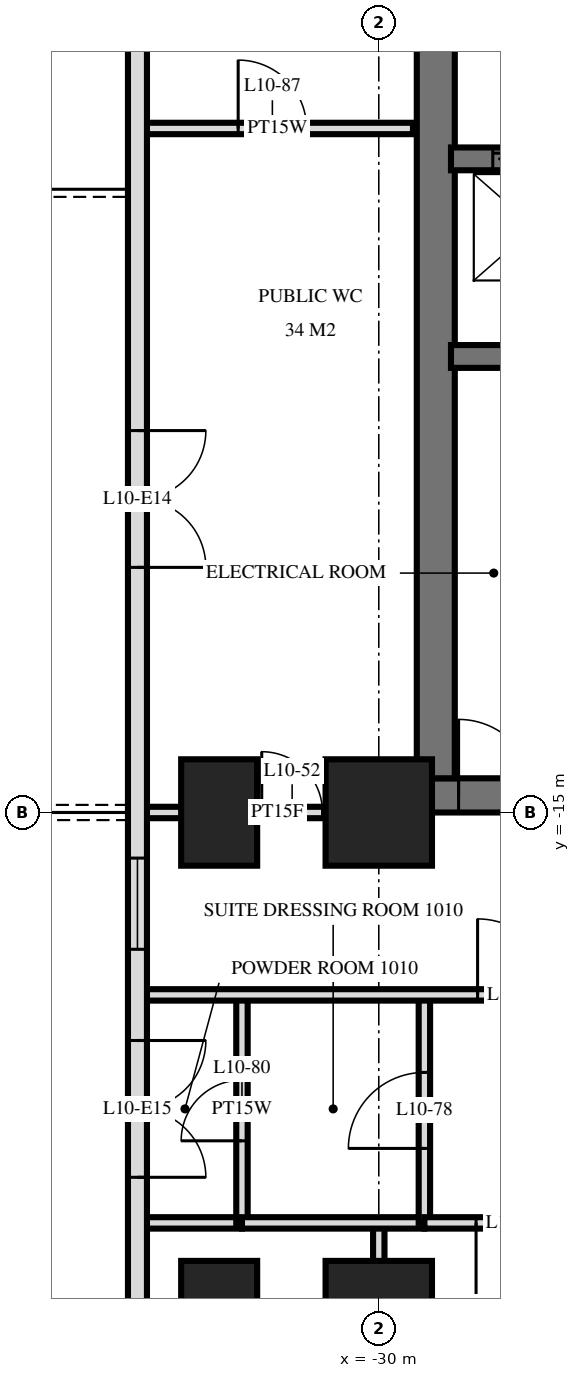
"""IFC4 building model, lengths in metres.
Left out: names, types, materials, properties, quantities, classifications, styles, units other than length and angle.
Written with IfcOpenShell. Run it as: python <this file> out.ifc"""

import sys

from ifc_helpers import new_model, si_unit, direction, frame, frame_2d, origin, origin_2d, place, context, subcontext, project, spatial, rectangle, extrude, element, fill, save


model = new_model("IFC4")
c1 = context("Model", 3, precision=1e-05, world=origin(), true_north=direction((0.0, 1.0)))
c2 = subcontext(c1, "Body", "Model", "MODEL_VIEW")
j1 = project(units=[si_unit("LENGTHUNIT", "METRE"), si_unit("PLANEANGLEUNIT", "RADIAN")], contexts=[c1])
p1 = place(None, origin())
s1 = spatial("IfcSite", under=j1, at=p1, CompositionType="ELEMENT")
p2 = place(p1, origin())
s2 = spatial("IfcBuilding", under=s1, at=p2, CompositionType="ELEMENT")
p3 = place(p2, frame((0.0, 0.0, 45.6)))
s3 = spatial("IfcBuildingStorey", under=s2, at=p3, CompositionType="ELEMENT", Elevation=45.6)
for number, where, z_axis, x_axis in (
    (1, (-32.1, -21.6, 0.0), (0.0, 0.0, 1.0), (0.0, 1.0, 0.0)),
    (2, (-32.1, -15.0, 0.0), (0.0, 0.0, 1.0), (0.0, 1.0, 0.0)),
):
    element("IfcColumn", number, at=place(p3, frame(where, z_axis=z_axis, x_axis=x_axis)), inside=s3, PredefinedType="COLUMN", context=c2, shape_type="SweptSolid", body=[
        extrude(rectangle(XDim=1.4, YDim=1.0, at=origin_2d()), origin(), (0.0, 0.0, 1.0), 3.6),
    ])
for number, where, z_axis, x_axis in (
    (3, (-30.0, -21.6, 0.0), (0.0, 0.0, 1.0), (1.0, 0.0, 0.0)),
    (4, (-30.0, -15.0, 0.0), (0.0, 0.0, 1.0), (1.0, 0.0, 0.0)),
):
    element("IfcColumn", number, at=place(p3, frame(where, z_axis=z_axis, x_axis=x_axis)), inside=s3, PredefinedType="COLUMN", context=c2, shape_type="SweptSolid", body=[
        extrude(rectangle(XDim=1.4, YDim=1.4, at=origin_2d()), origin(), (0.0, 0.0, 1.0), 3.6),
    ])
p4 = place(p3, frame((-29.5, -14.775, 0.0), z_axis=(0.0, 0.0, 1.0), x_axis=(1.0, 0.0, 0.0)))
e5 = element("IfcWall", 5, at=p4, inside=s3, PredefinedType="SHEAR", context=c2, shape_type="SweptSolid", body=[
    extrude(rectangle(XDim=19.5, YDim=0.45, at=frame_2d((9.75, 0.0))), origin(), (0.0, 0.0, 1.0), 3.6),
])
p5 = place(p4, frame((11.2, 0.0, 0.0)))
e6 = element("IfcOpeningElement", 6, at=p5, cuts=e5, PredefinedType="OPENING", context=c2, shape_type="SweptSolid", body=[
    extrude(rectangle(XDim=1.2, YDim=2.1, at=frame_2d((0.6, 1.05))), frame((0.0, 0.235, 0.0), z_axis=(0.0, -1.0, 0.0), x_axis=(1.0, 0.0, 0.0)), (0.0, 0.0, 1.0), 0.47),
])
p6 = place(p4, frame((14.25, 0.0, 0.0)))
e7 = element("IfcOpeningElement", 7, at=p6, cuts=e5, PredefinedType="OPENING", context=c2, shape_type="SweptSolid", body=[
    extrude(rectangle(XDim=1.1, YDim=2.1, at=frame_2d((0.55, 1.05))), frame((0.0, 0.235, 0.0), z_axis=(0.0, -1.0, 0.0), x_axis=(1.0, 0.0, 0.0)), (0.0, 0.0, 1.0), 0.47),
])
p7 = place(p4, frame((8.5, 0.0, 0.0)))
e8 = element("IfcOpeningElement", 8, at=p7, cuts=e5, PredefinedType="OPENING", context=c2, shape_type="SweptSolid", body=[
    extrude(rectangle(XDim=0.9, YDim=2.1, at=frame_2d((0.45, 1.05))), frame((0.0, 0.235, 0.0), z_axis=(0.0, -1.0, 0.0), x_axis=(1.0, 0.0, 0.0)), (0.0, 0.0, 1.0), 0.47),
])
p8 = place(p4, frame((6.05, 0.0, 0.0)))
e9 = element("IfcOpeningElement", 9, at=p8, cuts=e5, PredefinedType="OPENING", context=c2, shape_type="SweptSolid", body=[
    extrude(rectangle(XDim=1.0, YDim=2.1, at=frame_2d((0.5, 1.05))), frame((0.0, 0.235, 0.0), z_axis=(0.0, -1.0, 0.0), x_axis=(1.0, 0.0, 0.0)), (0.0, 0.0, 1.0), 0.47),
])
p9 = place(p4, frame((3.587, 0.0, 0.0)))
e10 = element("IfcOpeningElement", 10, at=p9, cuts=e5, PredefinedType="OPENING", context=c2, shape_type="SweptSolid", body=[
    extrude(rectangle(XDim=1.0, YDim=2.1, at=frame_2d((0.5, 1.05))), frame((0.0, 0.235, 0.0), z_axis=(0.0, -1.0, 0.0), x_axis=(1.0, 0.0, 0.0)), (0.0, 0.0, 1.0), 0.47),
])
p10 = place(p4, frame((1.85, 0.0, 0.0)))
e11 = element("IfcOpeningElement", 11, at=p10, cuts=e5, PredefinedType="OPENING", context=c2, shape_type="SweptSolid", body=[
    extrude(rectangle(XDim=1.0, YDim=2.1, at=frame_2d((0.5, 1.05))), frame((0.0, 0.235, 0.0), z_axis=(0.0, -1.0, 0.0), x_axis=(1.0, 0.0, 0.0)), (0.0, 0.0, 1.0), 0.47),
])
p11 = place(p4, frame((0.55, 0.0, 0.0)))
e12 = element("IfcOpeningElement", 12, at=p11, cuts=e5, PredefinedType="OPENING", context=c2, shape_type="SweptSolid", body=[
    extrude(rectangle(XDim=1.0, YDim=2.1, at=frame_2d((0.5, 1.05))), frame((0.0, 0.235, 0.0), z_axis=(0.0, -1.0, 0.0), x_axis=(1.0, 0.0, 0.0)), (0.0, 0.0, 1.0), 0.47),
])
p12 = place(p3, frame((-29.25, -14.55, 0.0), z_axis=(0.0, 0.0, 1.0), x_axis=(0.0, 1.0, 0.0)))
e13 = element("IfcWall", 13, at=p12, inside=s3, PredefinedType="SHEAR", context=c2, shape_type="SweptSolid", body=[
    extrude(rectangle(XDim=14.1, YDim=0.5, at=frame_2d((7.05, 0.0))), origin(), (0.0, 0.0, 1.0), 3.6),
])
p13 = place(p3, frame((-29.05, -6.4, 0.0), z_axis=(0.0, 0.0, 1.0), x_axis=(1.0, 0.0, 0.0)))
e14 = element("IfcWall", 14, at=p13, inside=s3, PredefinedType="SHEAR", context=c2, shape_type="SweptSolid", body=[
    extrude(rectangle(XDim=18.7, YDim=0.3, at=frame_2d((9.35, 0.0))), origin(), (0.0, 0.0, 1.0), 3.6),
])
p14 = place(p13, frame((2.95, 0.0, 0.0)))
e15 = element("IfcOpeningElement", 15, at=p14, cuts=e14, PredefinedType="OPENING", context=c2, shape_type="SweptSolid", body=[
    extrude(rectangle(XDim=1.1, YDim=2.1, at=frame_2d((0.55, 1.05))), frame((0.0, 0.16, 0.0), z_axis=(0.0, -1.0, 0.0), x_axis=(1.0, 0.0, 0.0)), (0.0, 0.0, 1.0), 0.32),
])
p15 = place(p13, frame((0.55, 0.0, 0.0)))
e16 = element("IfcOpeningElement", 16, at=p15, cuts=e14, PredefinedType="OPENING", context=c2, shape_type="SweptSolid", body=[
    extrude(rectangle(XDim=1.1, YDim=2.1, at=frame_2d((0.55, 1.05))), frame((0.0, 0.16, 0.0), z_axis=(0.0, -1.0, 0.0), x_axis=(1.0, 0.0, 0.0)), (0.0, 0.0, 1.0), 0.32),
])
p16 = place(p13, frame((10.8, 0.0, 0.0)))
e17 = element("IfcOpeningElement", 17, at=p16, cuts=e14, PredefinedType="OPENING", context=c2, shape_type="SweptSolid", body=[
    extrude(rectangle(XDim=1.1, YDim=2.1, at=frame_2d((0.55, 1.05))), frame((0.0, 0.16, 0.0), z_axis=(0.0, -1.0, 0.0), x_axis=(1.0, 0.0, 0.0)), (0.0, 0.0, 1.0), 0.32),
])
p17 = place(p13, frame((5.6, 0.0, 0.0)))
e18 = element("IfcOpeningElement", 18, at=p17, cuts=e14, PredefinedType="OPENING", context=c2, shape_type="SweptSolid", body=[
    extrude(rectangle(XDim=1.0, YDim=2.1, at=frame_2d((0.5, 1.05))), frame((0.0, 0.16, 0.0), z_axis=(0.0, -1.0, 0.0), x_axis=(1.0, 0.0, 0.0)), (0.0, 0.0, 1.0), 0.32),
])
p18 = place(p3, frame((-29.05, -9.0, 0.0), z_axis=(0.0, 0.0, 1.0), x_axis=(1.0, 0.0, 0.0)))
e19 = element("IfcWall", 19, at=p18, inside=s3, PredefinedType="SHEAR", context=c2, shape_type="SweptSolid", body=[
    extrude(rectangle(XDim=18.7, YDim=0.3, at=frame_2d((9.35, 0.0))), origin(), (0.0, 0.0, 1.0), 3.6),
])
p19 = place(p18, frame((13.8, 0.0, 0.0)))
e20 = element("IfcOpeningElement", 20, at=p19, cuts=e19, PredefinedType="OPENING", context=c2, shape_type="SweptSolid", body=[
    extrude(rectangle(XDim=1.1, YDim=2.1, at=frame_2d((0.55, 1.05))), frame((0.0, 0.16, 0.0), z_axis=(0.0, -1.0, 0.0), x_axis=(1.0, 0.0, 0.0)), (0.0, 0.0, 1.0), 0.32),
])
p20 = place(p3, frame((-33.175, -3.325, 0.0), z_axis=(0.0, 0.0, 1.0), x_axis=(0.0, -1.0, 0.0)))
e21 = element("IfcWall", 21, at=p20, inside=s3, PredefinedType="SOLIDWALL", context=c2, shape_type="SweptSolid", body=[
    extrude(rectangle(XDim=21.551, YDim=0.25, at=frame_2d((10.775, 0.0))), origin(), (0.0, 0.0, 1.0), 3.32),
])
p21 = place(p20, frame((6.65, 0.0, 0.0)))
e22 = element("IfcOpeningElement", 22, at=p21, cuts=e21, PredefinedType="OPENING", context=c2, shape_type="SweptSolid", body=[
    extrude(rectangle(XDim=1.8, YDim=2.4, at=frame_2d((0.9, 1.2))), frame((0.0, 0.135, 0.0), z_axis=(0.0, -1.0, 0.0), x_axis=(1.0, 0.0, 0.0)), (0.0, 0.0, 1.0), 0.27),
])
p22 = place(p20, frame((12.275, 0.0, 0.3)))
e23 = element("IfcOpeningElement", 23, at=p22, cuts=e21, PredefinedType="OPENING", context=c2, shape_type="SweptSolid", body=[
    extrude(rectangle(XDim=1.2, YDim=2.1, at=frame_2d((0.6, 1.05))), frame((0.0, 0.135, 0.0), z_axis=(0.0, -1.0, 0.0), x_axis=(1.0, 0.0, 0.0)), (0.0, 0.0, 1.0), 0.27),
])
p23 = place(p20, frame((14.675, 0.0, 0.0)))
e24 = element("IfcOpeningElement", 24, at=p23, cuts=e21, PredefinedType="OPENING", context=c2, shape_type="SweptSolid", body=[
    extrude(rectangle(XDim=1.8, YDim=2.4, at=frame_2d((0.9, 1.2))), frame((0.0, 0.135, 0.0), z_axis=(0.0, -1.0, 0.0), x_axis=(1.0, 0.0, 0.0)), (0.0, 0.0, 1.0), 0.27),
])
p24 = place(p20, frame((18.875, 0.0, 0.0)))
e25 = element("IfcOpeningElement", 25, at=p24, cuts=e21, PredefinedType="OPENING", context=c2, shape_type="SweptSolid", body=[
    extrude(rectangle(XDim=1.8, YDim=2.4, at=frame_2d((0.9, 1.2))), frame((0.0, 0.135, 0.0), z_axis=(0.0, -1.0, 0.0), x_axis=(1.0, 0.0, 0.0)), (0.0, 0.0, 1.0), 0.27),
])
p25 = place(p3, frame((-29.4, -20.4, 0.0), z_axis=(0.0, 0.0, 1.0), x_axis=(0.0, 1.0, 0.0)))
e26 = element("IfcWall", 26, at=p25, inside=s3, PredefinedType="PARTITIONING", context=c2, shape_type="SweptSolid", body=[
    extrude(rectangle(XDim=3.0, YDim=0.15, at=frame_2d((1.5, 0.0))), origin(), (0.0, 0.0, 1.0), 3.32),
])
p26 = place(p25, frame((0.98, 0.0, 0.0)))
e27 = element("IfcOpeningElement", 27, at=p26, cuts=e26, PredefinedType="OPENING", context=c2, shape_type="SweptSolid", body=[
    extrude(rectangle(XDim=1.0, YDim=2.1, at=frame_2d((0.5, 1.05))), frame((0.0, 0.085, 0.0), z_axis=(0.0, -1.0, 0.0), x_axis=(1.0, 0.0, 0.0)), (0.0, 0.0, 1.0), 0.17),
])
p27 = place(p3, frame((-30.0, -28.978, 0.0), z_axis=(0.0, 0.0, 1.0), x_axis=(0.0, 1.0, 0.0)))
e28 = element("IfcWall", 28, at=p27, inside=s3, PredefinedType="PARTITIONING", context=c2, shape_type="SweptSolid", body=[
    extrude(rectangle(XDim=8.578, YDim=0.15, at=frame_2d((4.289, 0.0))), origin(), (0.0, 0.0, 1.0), 3.32),
])
p28 = place(p27, frame((3.737, 0.0, 0.0)))
e29 = element("IfcOpeningElement", 29, at=p28, cuts=e28, PredefinedType="OPENING", context=c2, shape_type="SweptSolid", body=[
    extrude(rectangle(XDim=0.9, YDim=2.1, at=frame_2d((0.45, 1.05))), frame((0.0, 0.085, 0.0), z_axis=(0.0, -1.0, 0.0), x_axis=(1.0, 0.0, 0.0)), (0.0, 0.0, 1.0), 0.17),
])
p29 = place(p3, frame((-31.8, -20.4, 0.0), z_axis=(0.0, 0.0, 1.0), x_axis=(0.0, 1.0, 0.0)))
e30 = element("IfcWall", 30, at=p29, inside=s3, PredefinedType="PLUMBINGWALL", context=c2, shape_type="SweptSolid", body=[
    extrude(rectangle(XDim=3.0, YDim=0.15, at=frame_2d((1.5, 0.0))), origin(), (0.0, 0.0, 1.0), 3.32),
])
p30 = place(p29, frame((1.08, 0.0, 0.0)))
e31 = element("IfcOpeningElement", 31, at=p30, cuts=e30, PredefinedType="OPENING", context=c2, shape_type="SweptSolid", body=[
    extrude(rectangle(XDim=0.8, YDim=2.1, at=frame_2d((0.4, 1.05))), frame((0.0, 0.085, 0.0), z_axis=(0.0, -1.0, 0.0), x_axis=(1.0, 0.0, 0.0)), (0.0, 0.0, 1.0), 0.17),
])
p31 = place(p3, frame((-29.4, -20.4, 0.0), z_axis=(0.0, 0.0, 1.0), x_axis=(1.0, 0.0, 0.0)))
e32 = element("IfcWall", 32, at=p31, inside=s3, PredefinedType="PARTITIONING", context=c2, shape_type="SweptSolid", body=[
    extrude(rectangle(XDim=2.4, YDim=0.15, at=frame_2d((1.2, 0.0))), origin(), (0.0, 0.0, 1.0), 3.32),
])
p32 = place(p31, frame((0.68, 0.0, 0.0)))
e33 = element("IfcOpeningElement", 33, at=p32, cuts=e32, PredefinedType="OPENING", context=c2, shape_type="SweptSolid", body=[
    extrude(rectangle(XDim=1.0, YDim=2.1, at=frame_2d((0.5, 1.05))), frame((0.0, 0.085, 0.0), z_axis=(0.0, -1.0, 0.0), x_axis=(1.0, 0.0, 0.0)), (0.0, 0.0, 1.0), 0.17),
])
p33 = place(p3, frame((-31.8, -20.4, 0.0), z_axis=(0.0, 0.0, 1.0), x_axis=(1.0, 0.0, 0.0)))
e34 = element("IfcWall", 34, at=p33, inside=s3, PredefinedType="PARTITIONING", context=c2, shape_type="SweptSolid", body=[
    extrude(rectangle(XDim=2.4, YDim=0.15, at=frame_2d((1.2, 0.0))), origin(), (0.0, 0.0, 1.0), 3.32),
])
p34 = place(p3, frame((-33.12, -20.4, 0.0), z_axis=(0.0, 0.0, 1.0), x_axis=(1.0, 0.0, 0.0)))
e35 = element("IfcWall", 35, at=p34, inside=s3, PredefinedType="PLUMBINGWALL", context=c2, shape_type="SweptSolid", body=[
    extrude(rectangle(XDim=1.32, YDim=0.15, at=frame_2d((0.66, 0.0))), origin(), (0.0, 0.0, 1.0), 3.32),
])
p35 = place(p3, frame((-33.12, -17.4, 0.0), z_axis=(0.0, 0.0, 1.0), x_axis=(1.0, 0.0, 0.0)))
e36 = element("IfcWall", 36, at=p35, inside=s3, PredefinedType="PARTITIONING", context=c2, shape_type="SweptSolid", body=[
    extrude(rectangle(XDim=66.24, YDim=0.15, at=frame_2d((33.12, 0.0))), origin(), (0.0, 0.0, 1.0), 3.32),
])
p36 = place(p35, frame((9.27, 0.0, 0.0)))
e37 = element("IfcOpeningElement", 37, at=p36, cuts=e36, PredefinedType="OPENING", context=c2, shape_type="SweptSolid", body=[
    extrude(rectangle(XDim=1.0, YDim=2.1, at=frame_2d((0.5, 1.05))), frame((0.0, 0.085, 0.0), z_axis=(0.0, -1.0, 0.0), x_axis=(1.0, 0.0, 0.0)), (0.0, 0.0, 1.0), 0.17),
])
p37 = place(p35, frame((13.97, 0.0, 0.0)))
e38 = element("IfcOpeningElement", 38, at=p37, cuts=e36, PredefinedType="OPENING", context=c2, shape_type="SweptSolid", body=[
    extrude(rectangle(XDim=1.0, YDim=2.1, at=frame_2d((0.5, 1.05))), frame((0.0, 0.085, 0.0), z_axis=(0.0, -1.0, 0.0), x_axis=(1.0, 0.0, 0.0)), (0.0, 0.0, 1.0), 0.17),
])
p38 = place(p35, frame((17.62, 0.0, 0.0)))
e39 = element("IfcOpeningElement", 39, at=p38, cuts=e36, PredefinedType="OPENING", context=c2, shape_type="SweptSolid", body=[
    extrude(rectangle(XDim=1.0, YDim=2.1, at=frame_2d((0.5, 1.05))), frame((0.0, 0.085, 0.0), z_axis=(0.0, -1.0, 0.0), x_axis=(1.0, 0.0, 0.0)), (0.0, 0.0, 1.0), 0.17),
])
p39 = place(p35, frame((21.27, 0.0, 0.0)))
e40 = element("IfcOpeningElement", 40, at=p39, cuts=e36, PredefinedType="OPENING", context=c2, shape_type="SweptSolid", body=[
    extrude(rectangle(XDim=1.0, YDim=2.1, at=frame_2d((0.5, 1.05))), frame((0.0, 0.085, 0.0), z_axis=(0.0, -1.0, 0.0), x_axis=(1.0, 0.0, 0.0)), (0.0, 0.0, 1.0), 0.17),
])
p40 = place(p35, frame((25.97, 0.0, 0.0)))
e41 = element("IfcOpeningElement", 41, at=p40, cuts=e36, PredefinedType="OPENING", context=c2, shape_type="SweptSolid", body=[
    extrude(rectangle(XDim=1.0, YDim=2.1, at=frame_2d((0.5, 1.05))), frame((0.0, 0.085, 0.0), z_axis=(0.0, -1.0, 0.0), x_axis=(1.0, 0.0, 0.0)), (0.0, 0.0, 1.0), 0.17),
])
p41 = place(p35, frame((35.62, 0.0, 0.0)))
e42 = element("IfcOpeningElement", 42, at=p41, cuts=e36, PredefinedType="OPENING", context=c2, shape_type="SweptSolid", body=[
    extrude(rectangle(XDim=1.0, YDim=2.1, at=frame_2d((0.5, 1.05))), frame((0.0, 0.085, 0.0), z_axis=(0.0, -1.0, 0.0), x_axis=(1.0, 0.0, 0.0)), (0.0, 0.0, 1.0), 0.17),
])
p42 = place(p35, frame((40.97, 0.0, 0.0)))
e43 = element("IfcOpeningElement", 43, at=p42, cuts=e36, PredefinedType="OPENING", context=c2, shape_type="SweptSolid", body=[
    extrude(rectangle(XDim=1.0, YDim=2.1, at=frame_2d((0.5, 1.05))), frame((0.0, 0.085, 0.0), z_axis=(0.0, -1.0, 0.0), x_axis=(1.0, 0.0, 0.0)), (0.0, 0.0, 1.0), 0.17),
])
p43 = place(p35, frame((42.27, 0.0, 0.0)))
e44 = element("IfcOpeningElement", 44, at=p43, cuts=e36, PredefinedType="OPENING", context=c2, shape_type="SweptSolid", body=[
    extrude(rectangle(XDim=1.0, YDim=2.1, at=frame_2d((0.5, 1.05))), frame((0.0, 0.085, 0.0), z_axis=(0.0, -1.0, 0.0), x_axis=(1.0, 0.0, 0.0)), (0.0, 0.0, 1.0), 0.17),
])
p44 = place(p35, frame((49.72, 0.0, 0.0)))
e45 = element("IfcOpeningElement", 45, at=p44, cuts=e36, PredefinedType="OPENING", context=c2, shape_type="SweptSolid", body=[
    extrude(rectangle(XDim=1.0, YDim=2.1, at=frame_2d((0.5, 1.05))), frame((0.0, 0.085, 0.0), z_axis=(0.0, -1.0, 0.0), x_axis=(1.0, 0.0, 0.0)), (0.0, 0.0, 1.0), 0.17),
])
p45 = place(p35, frame((51.27, 0.0, 0.0)))
e46 = element("IfcOpeningElement", 46, at=p45, cuts=e36, PredefinedType="OPENING", context=c2, shape_type="SweptSolid", body=[
    extrude(rectangle(XDim=1.0, YDim=2.1, at=frame_2d((0.5, 1.05))), frame((0.0, 0.085, 0.0), z_axis=(0.0, -1.0, 0.0), x_axis=(1.0, 0.0, 0.0)), (0.0, 0.0, 1.0), 0.17),
])
p46 = place(p35, frame((4.42, 0.0, 0.0)))
e47 = element("IfcOpeningElement", 47, at=p46, cuts=e36, PredefinedType="OPENING", context=c2, shape_type="SweptSolid", body=[
    extrude(rectangle(XDim=1.0, YDim=2.1, at=frame_2d((0.5, 1.05))), frame((0.0, 0.085, 0.0), z_axis=(0.0, -1.0, 0.0), x_axis=(1.0, 0.0, 0.0)), (0.0, 0.0, 1.0), 0.17),
])
p47 = place(p35, frame((54.82, 0.0, 0.0)))
e48 = element("IfcOpeningElement", 48, at=p47, cuts=e36, PredefinedType="OPENING", context=c2, shape_type="SweptSolid", body=[
    extrude(rectangle(XDim=1.0, YDim=2.1, at=frame_2d((0.5, 1.05))), frame((0.0, 0.085, 0.0), z_axis=(0.0, -1.0, 0.0), x_axis=(1.0, 0.0, 0.0)), (0.0, 0.0, 1.0), 0.17),
])
p48 = place(p3, frame((-33.12, -15.0, 0.0), z_axis=(0.0, 0.0, 1.0), x_axis=(1.0, 0.0, 0.0)))
e49 = element("IfcWall", 49, at=p48, inside=s3, PredefinedType="PARTITIONING", context=c2, shape_type="SweptSolid", body=[
    extrude(rectangle(XDim=3.57, YDim=0.15, at=frame_2d((1.785, 0.0))), origin(), (0.0, 0.0, 1.0), 3.32),
])
p49 = place(p48, frame((1.58, 0.0, 0.0)))
e50 = element("IfcOpeningElement", 50, at=p49, cuts=e49, PredefinedType="OPENING", context=c2, shape_type="SweptSolid", body=[
    extrude(rectangle(XDim=0.8, YDim=2.1, at=frame_2d((0.4, 1.05))), frame((0.0, 0.085, 0.0), z_axis=(0.0, -1.0, 0.0), x_axis=(1.0, 0.0, 0.0)), (0.0, 0.0, 1.0), 0.17),
])
p50 = place(p3, frame((-33.12, -6.0, 0.0), z_axis=(0.0, 0.0, 1.0), x_axis=(1.0, 0.0, 0.0)))
e51 = element("IfcWall", 51, at=p50, inside=s3, PredefinedType="PLUMBINGWALL", context=c2, shape_type="SweptSolid", body=[
    extrude(rectangle(XDim=3.57, YDim=0.15, at=frame_2d((1.785, 0.0))), origin(), (0.0, 0.0, 1.0), 3.32),
])
p51 = place(p50, frame((1.27, 0.0, 0.0)))
e52 = element("IfcOpeningElement", 52, at=p51, cuts=e51, PredefinedType="OPENING", context=c2, shape_type="SweptSolid", body=[
    extrude(rectangle(XDim=0.9, YDim=2.1, at=frame_2d((0.45, 1.05))), frame((0.0, 0.085, 0.0), z_axis=(0.0, -1.0, 0.0), x_axis=(1.0, 0.0, 0.0)), (0.0, 0.0, 1.0), 0.17),
])
p52 = place(p21, origin())
e53 = element("IfcDoor", 53, at=p52, inside=s3, OperationType="DOUBLE_DOOR_SINGLE_SWING", PredefinedType="DOOR", context=c2, shape_type="SweptSolid", body=[
    extrude(rectangle(XDim=1.8, YDim=2.4, at=frame_2d((0.9, 1.2))), frame((0.0, 0.025, 0.0), z_axis=(0.0, -1.0, 0.0), x_axis=(1.0, 0.0, 0.0)), (0.0, 0.0, 1.0), 0.05),
])
fill(e22, e53)
p53 = place(p22, origin())
e54 = element("IfcWindow", 54, at=p53, inside=s3, PartitioningType="SINGLE_PANEL", PredefinedType="WINDOW", context=c2, shape_type="SweptSolid", body=[
    extrude(rectangle(XDim=1.2, YDim=2.1, at=frame_2d((0.6, 1.05))), frame((0.0, 0.03, 0.0), z_axis=(0.0, -1.0, 0.0), x_axis=(1.0, 0.0, 0.0)), (0.0, 0.0, 1.0), 0.06),
])
fill(e23, e54)
p54 = place(p23, origin())
e55 = element("IfcDoor", 55, at=p54, inside=s3, OperationType="DOUBLE_DOOR_SINGLE_SWING", PredefinedType="DOOR", context=c2, shape_type="SweptSolid", body=[
    extrude(rectangle(XDim=1.8, YDim=2.4, at=frame_2d((0.9, 1.2))), frame((0.0, 0.025, 0.0), z_axis=(0.0, -1.0, 0.0), x_axis=(1.0, 0.0, 0.0)), (0.0, 0.0, 1.0), 0.05),
])
fill(e24, e55)
p55 = place(p15, origin())
e56 = element("IfcDoor", 56, at=p55, inside=s3, OperationType="DOUBLE_DOOR_SLIDING", PredefinedType="USERDEFINED", context=c2, shape_type="SweptSolid", body=[
    extrude(rectangle(XDim=1.1, YDim=2.1, at=frame_2d((0.55, 1.05))), frame((0.0, 0.025, 0.0), z_axis=(0.0, -1.0, 0.0), x_axis=(1.0, 0.0, 0.0)), (0.0, 0.0, 1.0), 0.05),
])
fill(e16, e56)
p56 = place(p11, origin())
e57 = element("IfcDoor", 57, at=p56, inside=s3, OperationType="SINGLE_SWING_RIGHT", PredefinedType="DOOR", context=c2, shape_type="SweptSolid", body=[
    extrude(rectangle(XDim=1.0, YDim=2.1, at=frame_2d((0.5, 1.05))), frame((0.0, 0.025, 0.0), z_axis=(0.0, -1.0, 0.0), x_axis=(1.0, 0.0, 0.0)), (0.0, 0.0, 1.0), 0.05),
])
fill(e12, e57)
p57 = place(p46, origin())
e58 = element("IfcDoor", 58, at=p57, inside=s3, OperationType="SINGLE_SWING_RIGHT", PredefinedType="DOOR", context=c2, shape_type="SweptSolid", body=[
    extrude(rectangle(XDim=1.0, YDim=2.1, at=frame_2d((0.5, 1.05))), frame((0.0, 0.025, 0.0), z_axis=(0.0, -1.0, 0.0), x_axis=(1.0, 0.0, 0.0)), (0.0, 0.0, 1.0), 0.05),
])
fill(e47, e58)
p58 = place(p49, origin())
e59 = element("IfcDoor", 59, at=p58, inside=s3, OperationType="SINGLE_SWING_RIGHT", PredefinedType="DOOR", context=c2, shape_type="SweptSolid", body=[
    extrude(rectangle(XDim=0.8, YDim=2.1, at=frame_2d((0.4, 1.05))), frame((0.0, 0.025, 0.0), z_axis=(0.0, -1.0, 0.0), x_axis=(1.0, 0.0, 0.0)), (0.0, 0.0, 1.0), 0.05),
])
fill(e50, e59)
p59 = place(p26, origin())
e60 = element("IfcDoor", 60, at=p59, inside=s3, OperationType="SINGLE_SWING_RIGHT", PredefinedType="DOOR", context=c2, shape_type="SweptSolid", body=[
    extrude(rectangle(XDim=1.0, YDim=2.1, at=frame_2d((0.5, 1.05))), frame((0.0, 0.025, 0.0), z_axis=(0.0, -1.0, 0.0), x_axis=(1.0, 0.0, 0.0)), (0.0, 0.0, 1.0), 0.05),
])
fill(e27, e60)
p60 = place(p32, frame((0.5, 0.0, 0.0), z_axis=(0.0, 0.0, 1.0), x_axis=(-1.0, 0.0, 0.0)))
e61 = element("IfcDoor", 61, at=p60, inside=s3, OperationType="SINGLE_SWING_LEFT", PredefinedType="DOOR", context=c2, shape_type="SweptSolid", body=[
    extrude(rectangle(XDim=1.0, YDim=2.1, at=frame_2d((0.0, 1.05))), frame((0.0, -0.025, 0.0), z_axis=(0.0, 1.0, 0.0), x_axis=(-1.0, 0.0, 0.0)), (0.0, 0.0, 1.0), 0.05),
])
fill(e33, e61)
p61 = place(p30, origin())
e62 = element("IfcDoor", 62, at=p61, inside=s3, OperationType="SINGLE_SWING_RIGHT", PredefinedType="DOOR", context=c2, shape_type="SweptSolid", body=[
    extrude(rectangle(XDim=0.8, YDim=2.1, at=frame_2d((0.4, 1.05))), frame((0.0, 0.025, 0.0), z_axis=(0.0, -1.0, 0.0), x_axis=(1.0, 0.0, 0.0)), (0.0, 0.0, 1.0), 0.05),
])
fill(e31, e62)
p62 = place(p51, origin())
e63 = element("IfcDoor", 63, at=p62, inside=s3, OperationType="SINGLE_SWING_RIGHT", PredefinedType="DOOR", context=c2, shape_type="SweptSolid", body=[
    extrude(rectangle(XDim=0.9, YDim=2.1, at=frame_2d((0.45, 1.05))), frame((0.0, 0.025, 0.0), z_axis=(0.0, -1.0, 0.0), x_axis=(1.0, 0.0, 0.0)), (0.0, 0.0, 1.0), 0.05),
])
fill(e52, e63)
save(model, sys.argv[1])
